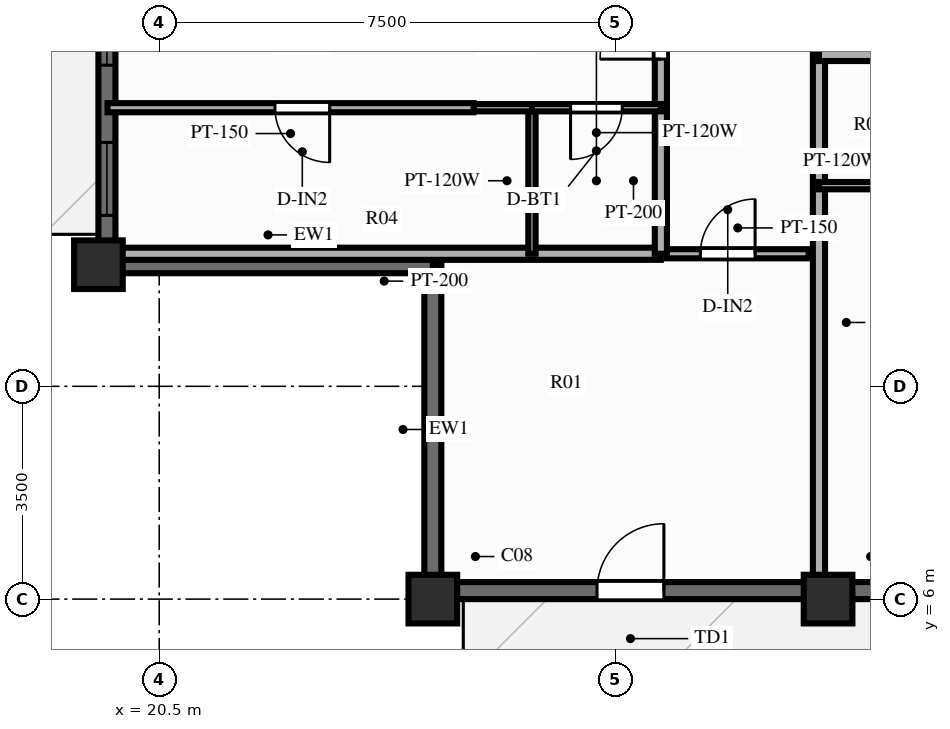
"""IFC4 building model, lengths in metres.
Left out: names, types, materials, properties, quantities, classifications, styles, units other than length and angle.
Written with IfcOpenShell. Run it as: python <this file> out.ifc"""

import sys

from ifc_helpers import new_model, si_unit, direction, frame, frame_2d, origin, origin_2d, place, context, subcontext, project, spatial, rectangle, extrude, source, transform, mapped, element, fill, save


model = new_model("IFC4")
c1 = context("Model", 3, precision=1e-05, world=origin(), true_north=direction((0.0, 1.0)))
c2 = subcontext(c1, "Body", "Model", "MODEL_VIEW")
j1 = project(units=[si_unit("LENGTHUNIT", "METRE"), si_unit("PLANEANGLEUNIT", "RADIAN")], contexts=[c1])
p1 = place(None, origin())
s1 = spatial("IfcSite", under=j1, at=p1, CompositionType="ELEMENT")
p2 = place(p1, origin())
s2 = spatial("IfcBuilding", under=s1, at=p2, CompositionType="ELEMENT")
p3 = place(p2, frame((0.0, 0.0, 199.6)))
s3 = spatial("IfcBuildingStorey", under=s2, at=p3, CompositionType="ELEMENT", Elevation=199.6)
m1 = source(origin(), c2, "Body", "SweptSolid", [
    extrude(rectangle(XDim=0.8, YDim=0.8, at=origin_2d()), origin(), (0.0, 0.0, 1.0), 3.0),
])
for number, where, z_axis, x_axis in (
    (1, (25.0, 6.0, 0.0), (0.0, 0.0, 1.0), (1.0, 0.0, 0.0)),
    (2, (31.5, 6.0, 0.0), (0.0, 0.0, 1.0), (1.0, 0.0, 0.0)),
    (3, (19.5, 11.5, 0.0), (0.0, 0.0, 1.0), (1.0, 0.0, 0.0)),
):
    element("IfcColumn", number, at=place(p3, frame(where, z_axis=z_axis, x_axis=x_axis)), inside=s3, PredefinedType="COLUMN", context=c2, shape_type="MappedRepresentation", body=[
        mapped(m1, transform((0.0, 0.0, 0.0), scale=1.0)),
    ])
p4 = place(p3, frame((25.0, 6.14, 0.0), z_axis=(0.0, 0.0, 1.0), x_axis=(1.0, 0.0, 0.0)))
e4 = element("IfcWall", 4, at=p4, inside=s3, PredefinedType="SOLIDWALL", context=c2, shape_type="SweptSolid", body=[
    extrude(rectangle(XDim=26.0, YDim=0.28, at=frame_2d((13.0, 0.0))), origin(), (0.0, 0.0, 1.0), 2.28),
])
p5 = place(p4, frame((3.8, 0.0, 0.0), z_axis=(0.0, 0.0, 1.0), x_axis=(-1.0, 0.0, 0.0)))
e5 = element("IfcOpeningElement", 5, at=p5, cuts=e4, PredefinedType="OPENING", context=c2, shape_type="SweptSolid", body=[
    extrude(rectangle(XDim=1.1, YDim=2.15, at=frame_2d((0.55, 1.075))), frame((0.0, 0.152, 0.0), z_axis=(0.0, -1.0, 0.0), x_axis=(1.0, 0.0, 0.0)), (0.0, 0.0, 1.0), 0.304),
])
p6 = place(p4, frame((7.37, 0.0, 0.25)))
e6 = element("IfcOpeningElement", 6, at=p6, cuts=e4, PredefinedType="OPENING", context=c2, shape_type="SweptSolid", body=[
    extrude(rectangle(XDim=1.2, YDim=1.5, at=frame_2d((0.6, 0.75))), frame((0.0, 0.152, 0.0), z_axis=(0.0, -1.0, 0.0), x_axis=(1.0, 0.0, 0.0)), (0.0, 0.0, 1.0), 0.304),
])
p7 = place(p4, frame((10.5, 0.0, 0.25)))
e7 = element("IfcOpeningElement", 7, at=p7, cuts=e4, PredefinedType="OPENING", context=c2, shape_type="SweptSolid", body=[
    extrude(rectangle(XDim=1.2, YDim=1.5, at=frame_2d((0.6, 0.75))), frame((0.0, 0.152, 0.0), z_axis=(0.0, -1.0, 0.0), x_axis=(1.0, 0.0, 0.0)), (0.0, 0.0, 1.0), 0.304),
])
p8 = place(p4, frame((14.3, 0.0, 0.25)))
e8 = element("IfcOpeningElement", 8, at=p8, cuts=e4, PredefinedType="OPENING", context=c2, shape_type="SweptSolid", body=[
    extrude(rectangle(XDim=1.2, YDim=1.5, at=frame_2d((0.6, 0.75))), frame((0.0, 0.152, 0.0), z_axis=(0.0, -1.0, 0.0), x_axis=(1.0, 0.0, 0.0)), (0.0, 0.0, 1.0), 0.304),
])
p9 = place(p4, frame((17.43, 0.0, 0.25)))
e9 = element("IfcOpeningElement", 9, at=p9, cuts=e4, PredefinedType="OPENING", context=c2, shape_type="SweptSolid", body=[
    extrude(rectangle(XDim=1.2, YDim=1.5, at=frame_2d((0.6, 0.75))), frame((0.0, 0.152, 0.0), z_axis=(0.0, -1.0, 0.0), x_axis=(1.0, 0.0, 0.0)), (0.0, 0.0, 1.0), 0.304),
])
p10 = place(p4, frame((22.15, 0.0, 0.25)))
e10 = element("IfcOpeningElement", 10, at=p10, cuts=e4, PredefinedType="OPENING", context=c2, shape_type="SweptSolid", body=[
    extrude(rectangle(XDim=1.2, YDim=1.5, at=frame_2d((0.6, 0.75))), frame((0.0, 0.152, 0.0), z_axis=(0.0, -1.0, 0.0), x_axis=(1.0, 0.0, 0.0)), (0.0, 0.0, 1.0), 0.304),
])
p11 = place(p3, frame((19.64, 11.5, 0.0), z_axis=(0.0, 0.0, 1.0), x_axis=(0.0, 1.0, 0.0)))
e11 = element("IfcWall", 11, at=p11, inside=s3, PredefinedType="SOLIDWALL", context=c2, shape_type="SweptSolid", body=[
    extrude(rectangle(XDim=31.0, YDim=0.28, at=frame_2d((15.5, 0.0))), origin(), (0.0, 0.0, 1.0), 2.28),
])
p12 = place(p11, frame((0.811, 0.0, 0.25)))
e12 = element("IfcOpeningElement", 12, at=p12, cuts=e11, PredefinedType="OPENING", context=c2, shape_type="SweptSolid", body=[
    extrude(rectangle(XDim=1.2, YDim=1.5, at=frame_2d((0.6, 0.75))), frame((0.0, 0.152, 0.0), z_axis=(0.0, -1.0, 0.0), x_axis=(1.0, 0.0, 0.0)), (0.0, 0.0, 1.0), 0.304),
])
p13 = place(p11, frame((3.281, 0.0, 0.25)))
e13 = element("IfcOpeningElement", 13, at=p13, cuts=e11, PredefinedType="OPENING", context=c2, shape_type="SweptSolid", body=[
    extrude(rectangle(XDim=1.2, YDim=1.5, at=frame_2d((0.6, 0.75))), frame((0.0, 0.152, 0.0), z_axis=(0.0, -1.0, 0.0), x_axis=(1.0, 0.0, 0.0)), (0.0, 0.0, 1.0), 0.304),
])
p14 = place(p11, frame((7.15, 0.0, 0.25)))
e14 = element("IfcOpeningElement", 14, at=p14, cuts=e11, PredefinedType="OPENING", context=c2, shape_type="SweptSolid", body=[
    extrude(rectangle(XDim=1.2, YDim=1.5, at=frame_2d((0.6, 0.75))), frame((0.0, 0.152, 0.0), z_axis=(0.0, -1.0, 0.0), x_axis=(1.0, 0.0, 0.0)), (0.0, 0.0, 1.0), 0.304),
])
p15 = place(p11, frame((9.36, 0.0, 0.25)))
e15 = element("IfcOpeningElement", 15, at=p15, cuts=e11, PredefinedType="OPENING", context=c2, shape_type="SweptSolid", body=[
    extrude(rectangle(XDim=1.2, YDim=1.5, at=frame_2d((0.6, 0.75))), frame((0.0, 0.152, 0.0), z_axis=(0.0, -1.0, 0.0), x_axis=(1.0, 0.0, 0.0)), (0.0, 0.0, 1.0), 0.304),
])
p16 = place(p11, frame((12.02, 0.0, 0.25)))
e16 = element("IfcOpeningElement", 16, at=p16, cuts=e11, PredefinedType="OPENING", context=c2, shape_type="SweptSolid", body=[
    extrude(rectangle(XDim=1.2, YDim=1.5, at=frame_2d((0.6, 0.75))), frame((0.0, 0.152, 0.0), z_axis=(0.0, -1.0, 0.0), x_axis=(1.0, 0.0, 0.0)), (0.0, 0.0, 1.0), 0.304),
])
p17 = place(p11, frame((15.108, 0.0, 0.25)))
e17 = element("IfcOpeningElement", 17, at=p17, cuts=e11, PredefinedType="OPENING", context=c2, shape_type="SweptSolid", body=[
    extrude(rectangle(XDim=1.2, YDim=1.5, at=frame_2d((0.6, 0.75))), frame((0.0, 0.152, 0.0), z_axis=(0.0, -1.0, 0.0), x_axis=(1.0, 0.0, 0.0)), (0.0, 0.0, 1.0), 0.304),
])
p18 = place(p11, frame((18.484, 0.0, 0.0)))
e18 = element("IfcOpeningElement", 18, at=p18, cuts=e11, PredefinedType="OPENING", context=c2, shape_type="SweptSolid", body=[
    extrude(rectangle(XDim=1.6, YDim=2.15, at=frame_2d((0.8, 1.075))), frame((0.0, 0.152, 0.0), z_axis=(0.0, -1.0, 0.0), x_axis=(1.0, 0.0, 0.0)), (0.0, 0.0, 1.0), 0.304),
])
p19 = place(p11, frame((22.054, 0.0, 0.25)))
e19 = element("IfcOpeningElement", 19, at=p19, cuts=e11, PredefinedType="OPENING", context=c2, shape_type="SweptSolid", body=[
    extrude(rectangle(XDim=1.2, YDim=1.5, at=frame_2d((0.6, 0.75))), frame((0.0, 0.152, 0.0), z_axis=(0.0, -1.0, 0.0), x_axis=(1.0, 0.0, 0.0)), (0.0, 0.0, 1.0), 0.304),
])
p20 = place(p11, frame((25.235, 0.0, 0.25)))
e20 = element("IfcOpeningElement", 20, at=p20, cuts=e11, PredefinedType="OPENING", context=c2, shape_type="SweptSolid", body=[
    extrude(rectangle(XDim=1.2, YDim=1.5, at=frame_2d((0.6, 0.75))), frame((0.0, 0.152, 0.0), z_axis=(0.0, -1.0, 0.0), x_axis=(1.0, 0.0, 0.0)), (0.0, 0.0, 1.0), 0.304),
])
p21 = place(p11, frame((28.245, 0.0, 0.25)))
e21 = element("IfcOpeningElement", 21, at=p21, cuts=e11, PredefinedType="OPENING", context=c2, shape_type="SweptSolid", body=[
    extrude(rectangle(XDim=1.2, YDim=1.5, at=frame_2d((0.6, 0.75))), frame((0.0, 0.152, 0.0), z_axis=(0.0, -1.0, 0.0), x_axis=(1.0, 0.0, 0.0)), (0.0, 0.0, 1.0), 0.304),
])
for number, where, z_axis, x_axis in (
    (22, (25.0, 6.08, 0.0), (0.0, 0.0, 1.0), (0.0, 1.0, 0.0)),
    (23, (19.58, 11.5, 0.0), (0.0, 0.0, 1.0), (1.0, 0.0, 0.0)),
):
    element("IfcWall", number, at=place(p3, frame(where, z_axis=z_axis, x_axis=x_axis)), inside=s3, PredefinedType="SOLIDWALL", context=c2, shape_type="SweptSolid", body=[
        extrude(rectangle(XDim=5.42, YDim=0.28, at=frame_2d((2.71, 0.0))), origin(), (0.0, 0.0, 1.0), 2.28),
    ])
p22 = place(p3, frame((28.85, 11.68, 0.0), z_axis=(0.0, 0.0, 1.0), x_axis=(1.0, 0.0, 0.0)))
e24 = element("IfcWall", 24, at=p22, inside=s3, PredefinedType="PARTITIONING", context=c2, shape_type="SweptSolid", body=[
    extrude(rectangle(XDim=2.33, YDim=0.15, at=frame_2d((1.165, 0.0))), origin(), (0.0, 0.0, 1.0), 2.79),
])
p23 = place(p22, frame((0.55, 0.0, 0.0)))
e25 = element("IfcOpeningElement", 25, at=p23, cuts=e24, PredefinedType="OPENING", context=c2, shape_type="SweptSolid", body=[
    extrude(rectangle(XDim=0.9, YDim=2.1, at=frame_2d((0.45, 1.05))), frame((0.0, 0.087, 0.0), z_axis=(0.0, -1.0, 0.0), x_axis=(1.0, 0.0, 0.0)), (0.0, 0.0, 1.0), 0.174),
])
p24 = place(p3, frame((31.35, 14.95, 0.0), z_axis=(0.0, 0.0, 1.0), x_axis=(0.0, -1.0, 0.0)))
e26 = element("IfcWall", 26, at=p24, inside=s3, PredefinedType="PARTITIONING", context=c2, shape_type="SweptSolid", body=[
    extrude(rectangle(XDim=8.8, YDim=0.2, at=frame_2d((4.4, 0.0))), origin(), (0.0, 0.0, 1.0), 2.39),
])
p25 = place(p3, frame((31.35, 14.95, 0.0), z_axis=(0.0, 0.0, 1.0), x_axis=(1.0, 0.0, 0.0)))
e27 = element("IfcWall", 27, at=p25, inside=s3, PredefinedType="PARTITIONING", context=c2, shape_type="SweptSolid", body=[
    extrude(rectangle(XDim=2.85, YDim=0.2, at=frame_2d((1.425, 0.0))), origin(), (0.0, 0.0, 1.0), 2.79),
])
p26 = place(p3, frame((31.35, 12.8, 0.0), z_axis=(0.0, 0.0, 1.0), x_axis=(1.0, 0.0, 0.0)))
e28 = element("IfcWall", 28, at=p26, inside=s3, PredefinedType="PARTITIONING", context=c2, shape_type="SweptSolid", body=[
    extrude(rectangle(XDim=2.85, YDim=0.12, at=frame_2d((1.425, 0.0))), origin(), (0.0, 0.0, 1.0), 2.79),
])
p27 = place(p3, frame((28.75, 11.68, 0.0), z_axis=(0.0, 0.0, 1.0), x_axis=(-1.0, 0.0, 0.0)))
e29 = element("IfcWall", 29, at=p27, inside=s3, PredefinedType="PARTITIONING", context=c2, shape_type="SweptSolid", body=[
    extrude(rectangle(XDim=9.1, YDim=0.2, at=frame_2d((4.55, 0.0))), origin(), (0.0, 0.0, 1.0), 2.79),
])
p28 = place(p3, frame((28.75, 11.68, 0.0), z_axis=(0.0, 0.0, 1.0), x_axis=(0.0, 1.0, 0.0)))
e30 = element("IfcWall", 30, at=p28, inside=s3, PredefinedType="PARTITIONING", context=c2, shape_type="SweptSolid", body=[
    extrude(rectangle(XDim=2.402, YDim=0.2, at=frame_2d((1.201, 0.0))), origin(), (0.0, 0.0, 1.0), 2.79),
])
p29 = place(p3, frame((28.75, 14.082, 0.0), z_axis=(0.0, 0.0, 1.0), x_axis=(0.0, 1.0, 0.0)))
e31 = element("IfcWall", 31, at=p29, inside=s3, PredefinedType="PARTITIONING", context=c2, shape_type="SweptSolid", body=[
    extrude(rectangle(XDim=2.598, YDim=0.2, at=frame_2d((1.299, 0.0))), origin(), (0.0, 0.0, 1.0), 2.79),
])
p30 = place(p29, frame((0.799, 0.0, 0.0)))
e32 = element("IfcOpeningElement", 32, at=p30, cuts=e31, PredefinedType="OPENING", context=c2, shape_type="SweptSolid", body=[
    extrude(rectangle(XDim=1.0, YDim=2.15, at=frame_2d((0.5, 1.075))), frame((0.0, 0.112, 0.0), z_axis=(0.0, -1.0, 0.0), x_axis=(1.0, 0.0, 0.0)), (0.0, 0.0, 1.0), 0.224),
])
p31 = place(p3, frame((26.63, 11.68, 0.0), z_axis=(0.0, 0.0, 1.0), x_axis=(0.0, 1.0, 0.0)))
e33 = element("IfcWall", 33, at=p31, inside=s3, PredefinedType="PARTITIONING", context=c2, shape_type="SweptSolid", body=[
    extrude(rectangle(XDim=2.402, YDim=0.12, at=frame_2d((1.201, 0.0))), origin(), (0.0, 0.0, 1.0), 2.79),
])
p32 = place(p3, frame((28.75, 14.082, 0.0), z_axis=(0.0, 0.0, 1.0), x_axis=(-1.0, 0.0, 0.0)))
e34 = element("IfcWall", 34, at=p32, inside=s3, PredefinedType="PARTITIONING", context=c2, shape_type="SweptSolid", body=[
    extrude(rectangle(XDim=2.12, YDim=0.12, at=frame_2d((1.06, 0.0))), origin(), (0.0, 0.0, 1.0), 2.79),
])
p33 = place(p32, frame((0.635, 0.0, 0.0)))
e35 = element("IfcOpeningElement", 35, at=p33, cuts=e34, PredefinedType="OPENING", context=c2, shape_type="SweptSolid", body=[
    extrude(rectangle(XDim=0.85, YDim=2.05, at=frame_2d((0.425, 1.025))), frame((0.0, 0.072, 0.0), z_axis=(0.0, -1.0, 0.0), x_axis=(1.0, 0.0, 0.0)), (0.0, 0.0, 1.0), 0.144),
])
p34 = place(p3, frame((26.63, 14.082, 0.0), z_axis=(0.0, 0.0, 1.0), x_axis=(-1.0, 0.0, 0.0)))
e36 = element("IfcWall", 36, at=p34, inside=s3, PredefinedType="PARTITIONING", context=c2, shape_type="SweptSolid", body=[
    extrude(rectangle(XDim=0.96, YDim=0.12, at=frame_2d((0.48, 0.0))), origin(), (0.0, 0.0, 1.0), 2.79),
])
p35 = place(p3, frame((25.67, 14.082, 0.0), z_axis=(0.0, 0.0, 1.0), x_axis=(-1.0, 0.0, 0.0)))
e37 = element("IfcWall", 37, at=p35, inside=s3, PredefinedType="PARTITIONING", context=c2, shape_type="SweptSolid", body=[
    extrude(rectangle(XDim=6.02, YDim=0.15, at=frame_2d((3.01, 0.0))), origin(), (0.0, 0.0, 1.0), 2.79),
])
p36 = place(p35, frame((2.367, 0.0, 0.0)))
e38 = element("IfcOpeningElement", 38, at=p36, cuts=e37, PredefinedType="OPENING", context=c2, shape_type="SweptSolid", body=[
    extrude(rectangle(XDim=0.9, YDim=2.1, at=frame_2d((0.45, 1.05))), frame((0.0, 0.087, 0.0), z_axis=(0.0, -1.0, 0.0), x_axis=(1.0, 0.0, 0.0)), (0.0, 0.0, 1.0), 0.174),
])
m2 = source(origin(), c2, "Body", "SweptSolid", [
    extrude(rectangle(XDim=1.1, YDim=2.15, at=frame_2d((0.55, 1.075))), frame((0.0, 0.025, 0.0), z_axis=(0.0, -1.0, 0.0), x_axis=(1.0, 0.0, 0.0)), (0.0, 0.0, 1.0), 0.05),
])
p37 = place(p5, origin())
e39 = element("IfcDoor", 39, at=p37, inside=s3, OperationType="SINGLE_SWING_LEFT", PredefinedType="DOOR", context=c2, shape_type="MappedRepresentation", body=[
    mapped(m2, transform((0.0, 0.0, 0.0), scale=1.0)),
])
fill(e5, e39)
m3 = source(origin(), c2, "Body", "SweptSolid", [
    extrude(rectangle(XDim=1.2, YDim=1.5, at=frame_2d((0.6, 0.75))), frame((0.0, 0.03, 0.0), z_axis=(0.0, -1.0, 0.0), x_axis=(1.0, 0.0, 0.0)), (0.0, 0.0, 1.0), 0.06),
])
p38 = place(p12, origin())
e40 = element("IfcWindow", 40, at=p38, inside=s3, PartitioningType="SINGLE_PANEL", PredefinedType="WINDOW", context=c2, shape_type="MappedRepresentation", body=[
    mapped(m3, transform((0.0, 0.0, 0.0), scale=1.0)),
])
fill(e12, e40)
p39 = place(p13, origin())
e41 = element("IfcWindow", 41, at=p39, inside=s3, PartitioningType="SINGLE_PANEL", PredefinedType="WINDOW", context=c2, shape_type="MappedRepresentation", body=[
    mapped(m3, transform((0.0, 0.0, 0.0), scale=1.0)),
])
fill(e13, e41)
m4 = source(origin(), c2, "Body", "SweptSolid", [
    extrude(rectangle(XDim=0.9, YDim=2.1, at=frame_2d((0.45, 1.05))), frame((0.0, 0.025, 0.0), z_axis=(0.0, -1.0, 0.0), x_axis=(1.0, 0.0, 0.0)), (0.0, 0.0, 1.0), 0.05),
])
p40 = place(p23, origin())
e42 = element("IfcDoor", 42, at=p40, inside=s3, OperationType="SINGLE_SWING_RIGHT", PredefinedType="DOOR", context=c2, shape_type="MappedRepresentation", body=[
    mapped(m4, transform((0.0, 0.0, 0.0), scale=1.0)),
])
fill(e25, e42)
m5 = source(origin(), c2, "Body", "SweptSolid", [
    extrude(rectangle(XDim=1.0, YDim=2.15, at=frame_2d((0.5, 1.075))), frame((0.0, 0.025, 0.0), z_axis=(0.0, -1.0, 0.0), x_axis=(1.0, 0.0, 0.0)), (0.0, 0.0, 1.0), 0.05),
])
p41 = place(p30, origin())
e43 = element("IfcDoor", 43, at=p41, inside=s3, OperationType="SINGLE_SWING_LEFT", PredefinedType="DOOR", context=c2, shape_type="MappedRepresentation", body=[
    mapped(m5, transform((0.0, 0.0, 0.0), scale=1.0)),
])
fill(e32, e43)
m6 = source(origin(), c2, "Body", "SweptSolid", [
    extrude(rectangle(XDim=0.85, YDim=2.05, at=frame_2d((0.425, 1.025))), frame((0.0, 0.025, 0.0), z_axis=(0.0, -1.0, 0.0), x_axis=(1.0, 0.0, 0.0)), (0.0, 0.0, 1.0), 0.05),
])
p42 = place(p33, origin())
e44 = element("IfcDoor", 44, at=p42, inside=s3, OperationType="SINGLE_SWING_RIGHT", PredefinedType="DOOR", context=c2, shape_type="MappedRepresentation", body=[
    mapped(m6, transform((0.0, 0.0, 0.0), scale=1.0)),
])
fill(e35, e44)
p43 = place(p36, origin())
e45 = element("IfcDoor", 45, at=p43, inside=s3, OperationType="SINGLE_SWING_LEFT", PredefinedType="DOOR", context=c2, shape_type="MappedRepresentation", body=[
    mapped(m4, transform((0.0, 0.0, 0.0), scale=1.0)),
])
fill(e38, e45)
save(model, sys.argv[1])
